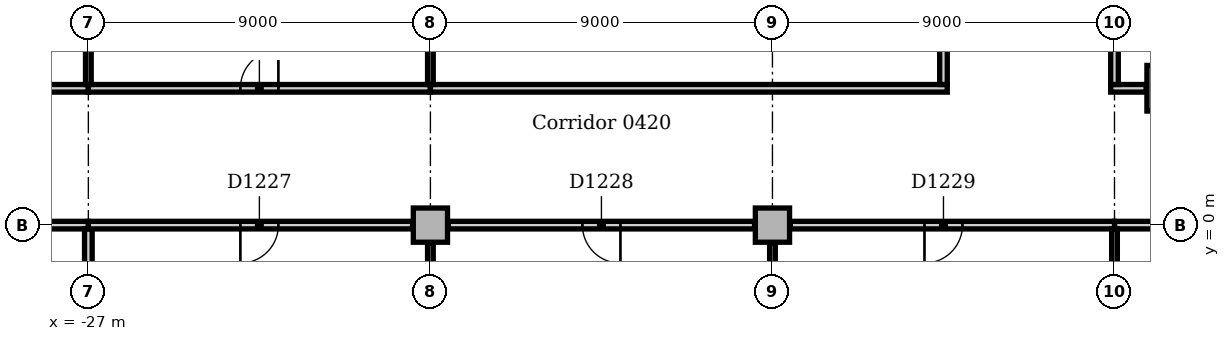
"""IFC4 building model, lengths in metres.
Left out: names, types, materials, properties, quantities, classifications, styles, units other than length and angle.
Written with IfcOpenShell. Run it as: python <this file> out.ifc"""

import sys

from ifc_helpers import new_model, si_unit, direction, frame, frame_2d, origin, origin_with_axes, origin_2d, place, context, subcontext, project, spatial, rectangle, extrude, element, fill, save


model = new_model("IFC4")
c1 = context("Model", 3, precision=1e-05, world=origin(), true_north=direction((0.0, 1.0)))
c2 = subcontext(c1, "Body", "Model", "MODEL_VIEW")
j1 = project(units=[si_unit("LENGTHUNIT", "METRE"), si_unit("PLANEANGLEUNIT", "RADIAN")], contexts=[c1])
p1 = place(None, origin())
s1 = spatial("IfcSite", under=j1, at=p1, CompositionType="ELEMENT")
p2 = place(p1, origin())
s2 = spatial("IfcBuilding", under=s1, at=p2, CompositionType="ELEMENT")
p3 = place(p2, frame((0.0, 0.0, 21.0)))
s3 = spatial("IfcBuildingStorey", under=s2, at=p3, CompositionType="ELEMENT", Elevation=21.0)
p4 = place(p3, frame((1.453, 3.602, 0.0), z_axis=(0.0, 0.0, 1.0), x_axis=(1.0, 0.0, 0.0)))
e1 = element("IfcColumn", 1, at=p4, inside=s3, PredefinedType="COLUMN", context=c2, shape_type="SweptSolid", body=[
    extrude(rectangle(XDim=1.2, YDim=1.2, at=origin_2d()), origin(), (0.0, 0.0, 1.0), 4.85),
])
for number, where, z_axis, x_axis in (
    (2, (-18.0, 0.0, 0.0), (0.0, 0.0, 1.0), (1.0, 0.0, 0.0)),
    (3, (-9.0, 0.0, 0.0), (0.0, 0.0, 1.0), (1.0, 0.0, 0.0)),
):
    element("IfcColumn", number, at=place(p3, frame(where, z_axis=z_axis, x_axis=x_axis)), inside=s3, PredefinedType="COLUMN", context=c2, shape_type="SweptSolid", body=[
        extrude(rectangle(XDim=0.9, YDim=0.9, at=origin_2d()), origin(), (0.0, 0.0, 1.0), 4.7),
    ])
p5 = place(p3, frame((-36.0, 0.0, 0.0), z_axis=(0.0, 0.0, 1.0), x_axis=(1.0, 0.0, 0.0)))
e4 = element("IfcWall", 4, at=p5, inside=s3, PredefinedType="SOLIDWALL", context=c2, shape_type="SweptSolid", body=[
    extrude(rectangle(XDim=9.0, YDim=0.2, at=frame_2d((4.5, 0.0))), origin(), (0.0, 0.0, 1.0), 4.7),
])
p6 = place(p5, frame((0.8, 0.0, 0.0)))
e5 = element("IfcOpeningElement", 5, at=p6, cuts=e4, PredefinedType="OPENING", context=c2, shape_type="SweptSolid", body=[
    extrude(rectangle(XDim=1.2, YDim=2.1, at=frame_2d((0.6, 1.05))), frame((0.0, 0.11, 0.0), z_axis=(0.0, -1.0, 0.0), x_axis=(1.0, 0.0, 0.0)), (0.0, 0.0, 1.0), 0.22),
])
p7 = place(p3, frame((-27.0, -4.65, 0.0), z_axis=(0.0, 0.0, 1.0), x_axis=(0.0, 1.0, 0.0)))
e6 = element("IfcWall", 6, at=p7, inside=s3, PredefinedType="SOLIDWALL", context=c2, shape_type="SweptSolid", body=[
    extrude(rectangle(XDim=4.55, YDim=0.2, at=frame_2d((2.275, 0.0))), origin(), (0.0, 0.0, 1.0), 4.7),
])
p8 = place(p3, frame((-36.0, 3.6, 0.0), z_axis=(0.0, 0.0, 1.0), x_axis=(1.0, 0.0, 0.0)))
e7 = element("IfcWall", 7, at=p8, inside=s3, PredefinedType="PARTITIONING", context=c2, shape_type="SweptSolid", body=[
    extrude(rectangle(XDim=9.0, YDim=0.2, at=frame_2d((4.5, 0.0))), origin(), (0.0, 0.0, 1.0), 4.7),
])
p9 = place(p8, frame((4.0, 0.0, 0.0)))
e8 = element("IfcOpeningElement", 8, at=p9, cuts=e7, PredefinedType="OPENING", context=c2, shape_type="SweptSolid", body=[
    extrude(rectangle(XDim=1.0, YDim=2.1, at=frame_2d((0.5, 1.05))), frame((0.0, 0.11, 0.0), z_axis=(0.0, -1.0, 0.0), x_axis=(1.0, 0.0, 0.0)), (0.0, 0.0, 1.0), 0.22),
])
p10 = place(p3, origin_with_axes())
e9 = element("IfcWall", 9, at=p10, inside=s3, PredefinedType="PARTITIONING", context=c2, shape_type="SweptSolid", body=[
    extrude(rectangle(XDim=9.0, YDim=0.2, at=frame_2d((4.5, 0.0))), origin(), (0.0, 0.0, 1.0), 4.7),
])
p11 = place(p10, frame((4.3, 0.0, 0.0)))
e10 = element("IfcOpeningElement", 10, at=p11, cuts=e9, PredefinedType="OPENING", context=c2, shape_type="SweptSolid", body=[
    extrude(rectangle(XDim=1.0, YDim=2.1, at=frame_2d((0.5, 1.05))), frame((0.0, 0.11, 0.0), z_axis=(0.0, -1.0, 0.0), x_axis=(1.0, 0.0, 0.0)), (0.0, 0.0, 1.0), 0.22),
])
p12 = place(p3, frame((-0.1, 3.6, 0.0), z_axis=(0.0, 0.0, 1.0), x_axis=(1.0, 0.0, 0.0)))
e11 = element("IfcWall", 11, at=p12, inside=s3, PredefinedType="PARTITIONING", context=c2, shape_type="SweptSolid", body=[
    extrude(rectangle(XDim=0.933, YDim=0.2, at=frame_2d((0.467, 0.0))), origin(), (0.0, 0.0, 1.0), 4.7),
])
p13 = place(p3, frame((-27.0, 3.6, 0.0), z_axis=(0.0, 0.0, 1.0), x_axis=(1.0, 0.0, 0.0)))
e12 = element("IfcWall", 12, at=p13, inside=s3, PredefinedType="PARTITIONING", context=c2, shape_type="SweptSolid", body=[
    extrude(rectangle(XDim=9.0, YDim=0.2, at=frame_2d((4.5, 0.0))), origin(), (0.0, 0.0, 1.0), 4.7),
])
p14 = place(p13, frame((4.0, 0.0, 0.0)))
e13 = element("IfcOpeningElement", 13, at=p14, cuts=e12, PredefinedType="OPENING", context=c2, shape_type="SweptSolid", body=[
    extrude(rectangle(XDim=1.0, YDim=2.1, at=frame_2d((0.5, 1.05))), frame((0.0, 0.11, 0.0), z_axis=(0.0, -1.0, 0.0), x_axis=(1.0, 0.0, 0.0)), (0.0, 0.0, 1.0), 0.22),
])
p15 = place(p3, frame((-18.0, 3.6, 0.0), z_axis=(0.0, 0.0, 1.0), x_axis=(1.0, 0.0, 0.0)))
e14 = element("IfcWall", 14, at=p15, inside=s3, PredefinedType="PARTITIONING", context=c2, shape_type="SweptSolid", body=[
    extrude(rectangle(XDim=13.6, YDim=0.2, at=frame_2d((6.8, 0.0))), origin(), (0.0, 0.0, 1.0), 4.7),
])
p16 = place(p3, frame((-27.0, 0.0, 0.0), z_axis=(0.0, 0.0, 1.0), x_axis=(1.0, 0.0, 0.0)))
e15 = element("IfcWall", 15, at=p16, inside=s3, PredefinedType="PARTITIONING", context=c2, shape_type="SweptSolid", body=[
    extrude(rectangle(XDim=8.53, YDim=0.2, at=frame_2d((4.265, 0.0))), origin(), (0.0, 0.0, 1.0), 4.7),
])
p17 = place(p16, frame((4.0, 0.0, 0.0)))
e16 = element("IfcOpeningElement", 16, at=p17, cuts=e15, PredefinedType="OPENING", context=c2, shape_type="SweptSolid", body=[
    extrude(rectangle(XDim=1.0, YDim=2.1, at=frame_2d((0.5, 1.05))), frame((0.0, 0.11, 0.0), z_axis=(0.0, -1.0, 0.0), x_axis=(1.0, 0.0, 0.0)), (0.0, 0.0, 1.0), 0.22),
])
p18 = place(p3, frame((-17.53, 0.0, 0.0), z_axis=(0.0, 0.0, 1.0), x_axis=(1.0, 0.0, 0.0)))
e17 = element("IfcWall", 17, at=p18, inside=s3, PredefinedType="PARTITIONING", context=c2, shape_type="SweptSolid", body=[
    extrude(rectangle(XDim=8.06, YDim=0.2, at=frame_2d((4.03, 0.0))), origin(), (0.0, 0.0, 1.0), 4.7),
])
p19 = place(p18, frame((3.53, 0.0, 0.0)))
e18 = element("IfcOpeningElement", 18, at=p19, cuts=e17, PredefinedType="OPENING", context=c2, shape_type="SweptSolid", body=[
    extrude(rectangle(XDim=1.0, YDim=2.1, at=frame_2d((0.5, 1.05))), frame((0.0, 0.11, 0.0), z_axis=(0.0, -1.0, 0.0), x_axis=(1.0, 0.0, 0.0)), (0.0, 0.0, 1.0), 0.22),
])
p20 = place(p3, frame((-8.53, 0.0, 0.0), z_axis=(0.0, 0.0, 1.0), x_axis=(1.0, 0.0, 0.0)))
e19 = element("IfcWall", 19, at=p20, inside=s3, PredefinedType="PARTITIONING", context=c2, shape_type="SweptSolid", body=[
    extrude(rectangle(XDim=8.53, YDim=0.2, at=frame_2d((4.265, 0.0))), origin(), (0.0, 0.0, 1.0), 4.7),
])
p21 = place(p20, frame((3.53, 0.0, 0.0)))
e20 = element("IfcOpeningElement", 20, at=p21, cuts=e19, PredefinedType="OPENING", context=c2, shape_type="SweptSolid", body=[
    extrude(rectangle(XDim=1.0, YDim=2.1, at=frame_2d((0.5, 1.05))), frame((0.0, 0.11, 0.0), z_axis=(0.0, -1.0, 0.0), x_axis=(1.0, 0.0, 0.0)), (0.0, 0.0, 1.0), 0.22),
])
p22 = place(p3, frame((-4.5, 3.7, 0.0), z_axis=(0.0, 0.0, 1.0), x_axis=(0.0, 1.0, 0.0)))
e21 = element("IfcWall", 21, at=p22, inside=s3, PredefinedType="PARTITIONING", context=c2, shape_type="SweptSolid", body=[
    extrude(rectangle(XDim=17.3, YDim=0.2, at=frame_2d((8.65, 0.0))), origin(), (0.0, 0.0, 1.0), 4.7),
])
p23 = place(p22, frame((7.7, 0.0, 0.0)))
e22 = element("IfcOpeningElement", 22, at=p23, cuts=e21, PredefinedType="OPENING", context=c2, shape_type="SweptSolid", body=[
    extrude(rectangle(XDim=1.8, YDim=2.1, at=frame_2d((0.9, 1.05))), frame((0.0, 0.11, 0.0), z_axis=(0.0, -1.0, 0.0), x_axis=(1.0, 0.0, 0.0)), (0.0, 0.0, 1.0), 0.22),
])
p24 = place(p3, frame((0.0, 3.7, 0.0), z_axis=(0.0, 0.0, 1.0), x_axis=(0.0, 1.0, 0.0)))
e23 = element("IfcWall", 23, at=p24, inside=s3, PredefinedType="PARTITIONING", context=c2, shape_type="SweptSolid", body=[
    extrude(rectangle(XDim=17.3, YDim=0.2, at=frame_2d((8.65, 0.0))), origin(), (0.0, 0.0, 1.0), 4.85),
])
p25 = place(p24, frame((8.1, 0.0, 0.0)))
e24 = element("IfcOpeningElement", 24, at=p25, cuts=e23, PredefinedType="OPENING", context=c2, shape_type="SweptSolid", body=[
    extrude(rectangle(XDim=1.0, YDim=2.1, at=frame_2d((0.5, 1.05))), frame((0.0, 0.11, 0.0), z_axis=(0.0, -1.0, 0.0), x_axis=(1.0, 0.0, 0.0)), (0.0, 0.0, 1.0), 0.22),
])
p26 = place(p3, frame((-18.0, 3.7, 0.0), z_axis=(0.0, 0.0, 1.0), x_axis=(0.0, 1.0, 0.0)))
e25 = element("IfcWall", 25, at=p26, inside=s3, PredefinedType="PARTITIONING", context=c2, shape_type="SweptSolid", body=[
    extrude(rectangle(XDim=4.83, YDim=0.15, at=frame_2d((2.415, 0.0))), origin(), (0.0, 0.0, 1.0), 4.7),
])
p27 = place(p3, frame((-27.0, 3.7, 0.0), z_axis=(0.0, 0.0, 1.0), x_axis=(0.0, 1.0, 0.0)))
e26 = element("IfcWall", 26, at=p27, inside=s3, PredefinedType="PARTITIONING", context=c2, shape_type="SweptSolid", body=[
    extrude(rectangle(XDim=17.2, YDim=0.15, at=frame_2d((8.6, 0.0))), origin(), (0.0, 0.0, 1.0), 4.7),
])
for number, where, z_axis, x_axis in (
    (27, (-18.0, -8.53, 0.0), (0.0, 0.0, 1.0), (0.0, 1.0, 0.0)),
    (28, (-9.0, -8.53, 0.0), (0.0, 0.0, 1.0), (0.0, 1.0, 0.0)),
):
    element("IfcWall", number, at=place(p3, frame(where, z_axis=z_axis, x_axis=x_axis)), inside=s3, PredefinedType="PARTITIONING", context=c2, shape_type="SweptSolid", body=[
        extrude(rectangle(XDim=8.06, YDim=0.15, at=frame_2d((4.03, 0.0))), origin(), (0.0, 0.0, 1.0), 4.7),
    ])
p28 = place(p3, frame((0.0, -8.53, 0.0), z_axis=(0.0, 0.0, 1.0), x_axis=(0.0, 1.0, 0.0)))
e29 = element("IfcWall", 29, at=p28, inside=s3, PredefinedType="PARTITIONING", context=c2, shape_type="SweptSolid", body=[
    extrude(rectangle(XDim=8.43, YDim=0.15, at=frame_2d((4.215, 0.0))), origin(), (0.0, 0.0, 1.0), 4.7),
])
p29 = place(p14, origin())
e30 = element("IfcDoor", 30, at=p29, inside=s3, OperationType="SINGLE_SWING_RIGHT", PredefinedType="DOOR", context=c2, shape_type="SweptSolid", body=[
    extrude(rectangle(XDim=1.0, YDim=2.1, at=frame_2d((0.5, 1.05))), frame((0.0, 0.025, 0.0), z_axis=(0.0, -1.0, 0.0), x_axis=(1.0, 0.0, 0.0)), (0.0, 0.0, 1.0), 0.05),
])
fill(e13, e30)
p30 = place(p17, frame((1.0, 0.0, 0.0), z_axis=(0.0, 0.0, 1.0), x_axis=(-1.0, 0.0, 0.0)))
e31 = element("IfcDoor", 31, at=p30, inside=s3, OperationType="SINGLE_SWING_RIGHT", PredefinedType="DOOR", context=c2, shape_type="SweptSolid", body=[
    extrude(rectangle(XDim=1.0, YDim=2.1, at=frame_2d((0.5, 1.05))), frame((0.0, 0.025, 0.0), z_axis=(0.0, -1.0, 0.0), x_axis=(1.0, 0.0, 0.0)), (0.0, 0.0, 1.0), 0.05),
])
fill(e16, e31)
p31 = place(p19, frame((1.0, 0.0, 0.0), z_axis=(0.0, 0.0, 1.0), x_axis=(-1.0, 0.0, 0.0)))
e32 = element("IfcDoor", 32, at=p31, inside=s3, OperationType="SINGLE_SWING_LEFT", PredefinedType="DOOR", context=c2, shape_type="SweptSolid", body=[
    extrude(rectangle(XDim=1.0, YDim=2.1, at=frame_2d((0.5, 1.05))), frame((0.0, 0.025, 0.0), z_axis=(0.0, -1.0, 0.0), x_axis=(1.0, 0.0, 0.0)), (0.0, 0.0, 1.0), 0.05),
])
fill(e18, e32)
p32 = place(p21, frame((1.0, 0.0, 0.0), z_axis=(0.0, 0.0, 1.0), x_axis=(-1.0, 0.0, 0.0)))
e33 = element("IfcDoor", 33, at=p32, inside=s3, OperationType="SINGLE_SWING_RIGHT", PredefinedType="DOOR", context=c2, shape_type="SweptSolid", body=[
    extrude(rectangle(XDim=1.0, YDim=2.1, at=frame_2d((0.5, 1.05))), frame((0.0, 0.025, 0.0), z_axis=(0.0, -1.0, 0.0), x_axis=(1.0, 0.0, 0.0)), (0.0, 0.0, 1.0), 0.05),
])
fill(e20, e33)
save(model, sys.argv[1])
